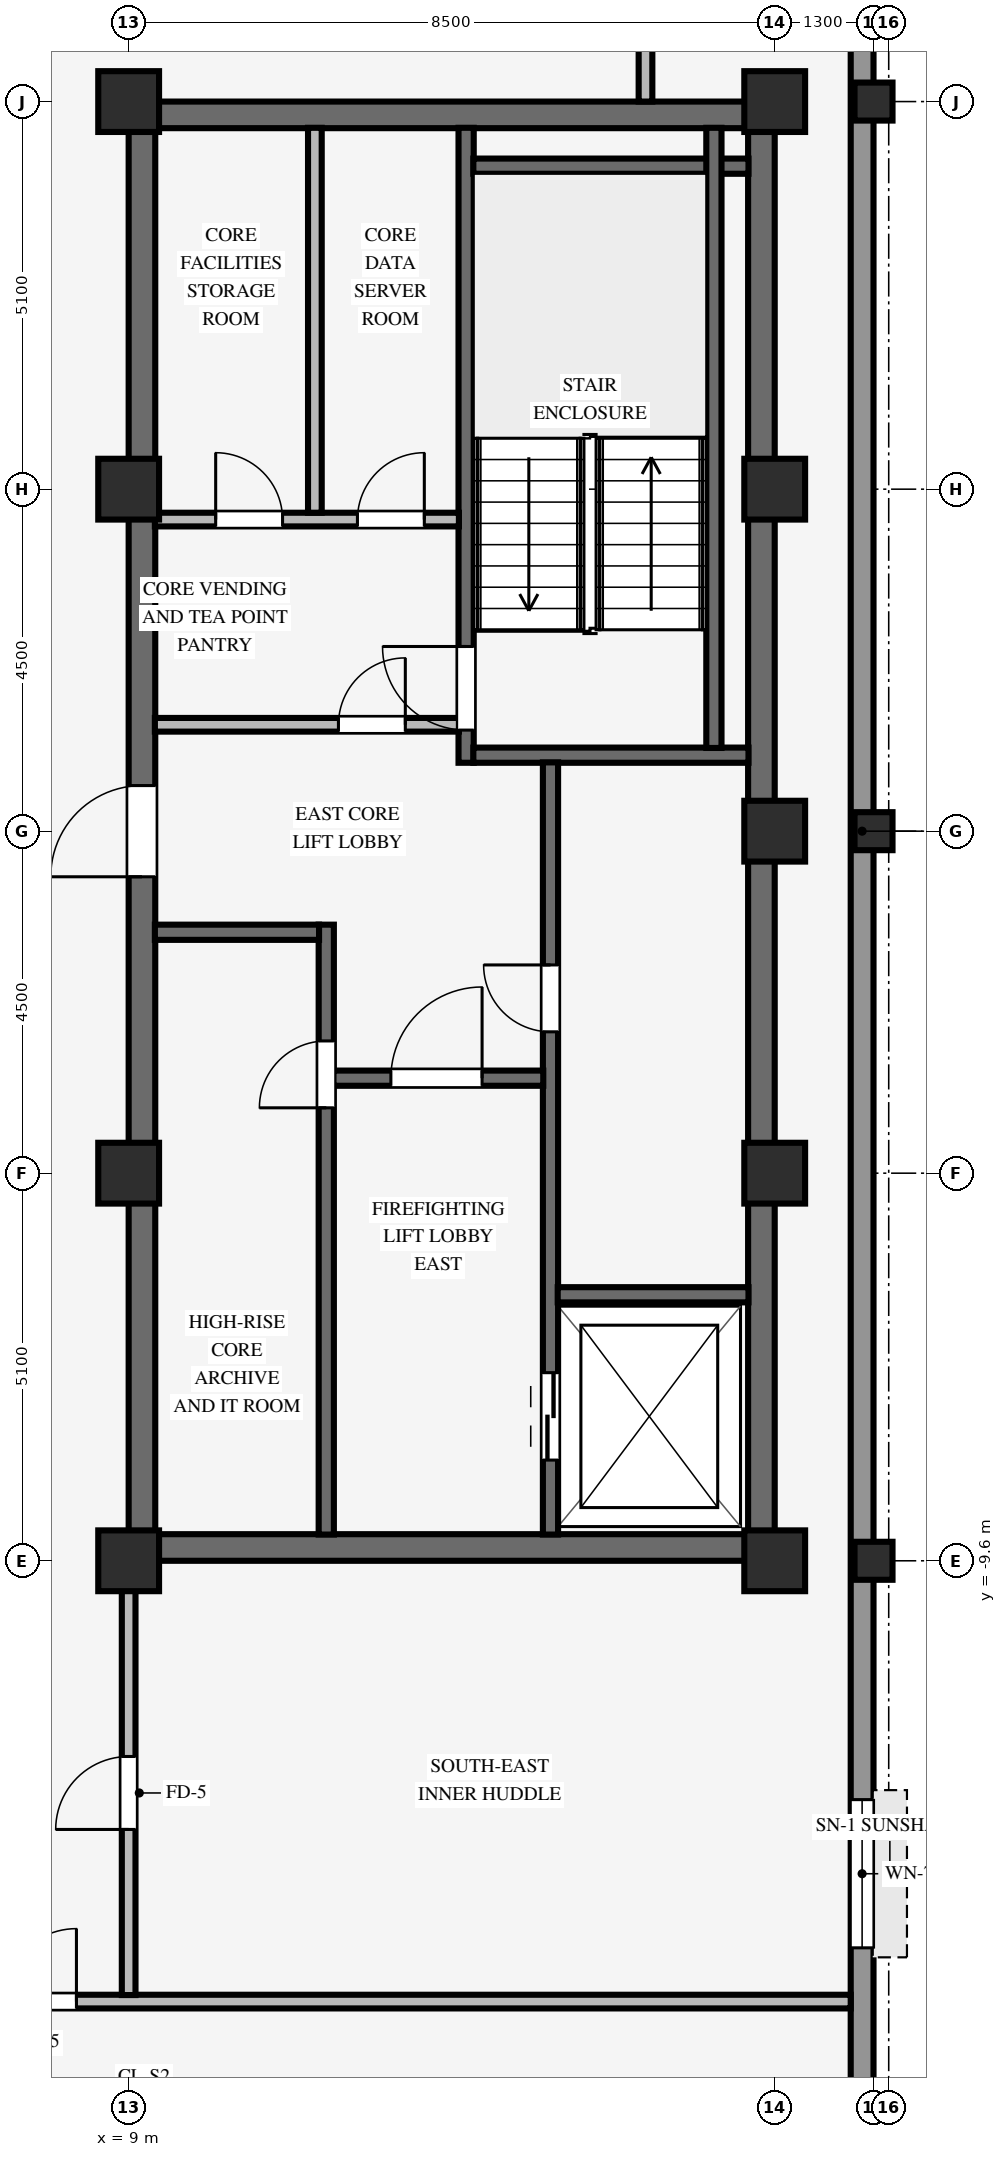
"""IFC4 building model, lengths in metres.
Left out: names, types, materials, properties, quantities, classifications, styles, units other than length and angle.
Written with IfcOpenShell. Run it as: python <this file> out.ifc"""

import sys

from ifc_helpers import new_model, si_unit, direction, frame, frame_2d, origin, origin_2d, place, context, subcontext, project, spatial, rectangle, hollow_rectangle, extrude, source, transform, mapped, element, fill, save


model = new_model("IFC4")
c1 = context("Model", 3, precision=1e-05, world=origin(), true_north=direction((0.0, 1.0)))
c2 = subcontext(c1, "Body", "Model", "MODEL_VIEW")
j1 = project(units=[si_unit("LENGTHUNIT", "METRE"), si_unit("PLANEANGLEUNIT", "RADIAN")], contexts=[c1])
p1 = place(None, origin())
s1 = spatial("IfcSite", under=j1, at=p1, CompositionType="ELEMENT")
p2 = place(p1, origin())
s2 = spatial("IfcBuilding", under=s1, at=p2, CompositionType="ELEMENT")
p3 = place(p2, frame((0.0, 0.0, 242.0)))
s3 = spatial("IfcBuildingStorey", under=s2, at=p3, CompositionType="ELEMENT", Elevation=242.0)
for number, where, z_axis, x_axis in (
    (1, (9.0, -9.425, 0.0), (0.0, 0.0, 1.0), (1.0, 0.0, 0.0)),
    (2, (9.0, 9.425, 0.0), (0.0, 0.0, 1.0), (1.0, 0.0, 0.0)),
):
    element("IfcWall", number, at=place(p3, frame(where, z_axis=z_axis, x_axis=x_axis)), inside=s3, PredefinedType="SHEAR", context=c2, shape_type="SweptSolid", body=[
        extrude(rectangle(XDim=8.5, YDim=0.35, at=frame_2d((4.25, 0.0))), origin(), (0.0, 0.0, 1.0), 3.25),
    ])
p4 = place(p3, frame((9.175, -9.255, 0.0), z_axis=(0.0, 0.0, 1.0), x_axis=(0.0, 1.0, 0.0)))
e3 = element("IfcWall", 3, at=p4, inside=s3, PredefinedType="SHEAR", context=c2, shape_type="SweptSolid", body=[
    extrude(rectangle(XDim=18.51, YDim=0.35, at=frame_2d((9.255, 0.0))), origin(), (0.0, 0.0, 1.0), 3.25),
])
p5 = place(p4, frame((8.655, 0.0, 0.0)))
e4 = element("IfcOpeningElement", 4, at=p5, cuts=e3, PredefinedType="OPENING", context=c2, shape_type="SweptSolid", body=[
    extrude(rectangle(XDim=1.2, YDim=2.15, at=frame_2d((0.6, 1.075))), frame((0.0, 0.185, 0.0), z_axis=(0.0, -1.0, 0.0), x_axis=(1.0, 0.0, 0.0)), (0.0, 0.0, 1.0), 0.37),
])
p6 = place(p3, frame((17.325, -9.255, 0.0), z_axis=(0.0, 0.0, 1.0), x_axis=(0.0, 1.0, 0.0)))
e5 = element("IfcWall", 5, at=p6, inside=s3, PredefinedType="SHEAR", context=c2, shape_type="SweptSolid", body=[
    extrude(rectangle(XDim=18.51, YDim=0.35, at=frame_2d((9.255, 0.0))), origin(), (0.0, 0.0, 1.0), 3.25),
])
for number, where, z_axis, x_axis in (
    (6, (9.0, -9.6, 0.0), (0.0, 0.0, 1.0), (1.0, 0.0, 0.0)),
    (7, (9.0, -4.5, 0.0), (0.0, 0.0, 1.0), (1.0, 0.0, 0.0)),
    (8, (9.0, 4.5, 0.0), (0.0, 0.0, 1.0), (1.0, 0.0, 0.0)),
    (9, (9.0, 9.6, 0.0), (0.0, 0.0, 1.0), (1.0, 0.0, 0.0)),
    (10, (17.5, -9.6, 0.0), (0.0, 0.0, 1.0), (1.0, 0.0, 0.0)),
    (11, (17.5, -4.5, 0.0), (0.0, 0.0, 1.0), (1.0, 0.0, 0.0)),
    (12, (17.5, 4.5, 0.0), (0.0, 0.0, 1.0), (1.0, 0.0, 0.0)),
    (13, (17.5, 9.6, 0.0), (0.0, 0.0, 1.0), (1.0, 0.0, 0.0)),
    (14, (17.5, 0.0, 0.0), (0.0, 0.0, 1.0), (1.0, 0.0, 0.0)),
):
    element("IfcColumn", number, at=place(p3, frame(where, z_axis=z_axis, x_axis=x_axis)), inside=s3, PredefinedType="COLUMN", context=c2, shape_type="SweptSolid", body=[
        extrude(rectangle(XDim=0.8, YDim=0.8, at=origin_2d()), origin(), (0.0, 0.0, 1.0), 3.25),
    ])
for number, where, z_axis, x_axis in (
    (15, (18.8, -9.6, 0.0), (0.0, 0.0, 1.0), (1.0, 0.0, 0.0)),
    (16, (18.8, 0.0, 0.0), (0.0, 0.0, 1.0), (1.0, 0.0, 0.0)),
    (17, (18.8, 9.6, 0.0), (0.0, 0.0, 1.0), (1.0, 0.0, 0.0)),
):
    element("IfcColumn", number, at=place(p3, frame(where, z_axis=z_axis, x_axis=x_axis)), inside=s3, PredefinedType="COLUMN", context=c2, shape_type="SweptSolid", body=[
        extrude(hollow_rectangle(XDim=0.5, YDim=0.5, WallThickness=0.032, InnerFilletRadius=0.032, OuterFilletRadius=0.064, at=origin_2d()), origin(), (0.0, 0.0, 1.0), 3.25),
    ])
p7 = place(p3, frame((18.65, -17.004, 0.0), z_axis=(0.0, 0.0, 1.0), x_axis=(0.0, 1.0, 0.0)))
e18 = element("IfcWall", 18, at=p7, inside=s3, PredefinedType="STANDARD", context=c2, shape_type="SweptSolid", body=[
    extrude(rectangle(XDim=34.008, YDim=0.3, at=frame_2d((17.004, 0.0))), origin(), (0.0, 0.0, 1.0), 2.585),
])
p8 = place(p7, frame((2.311, 0.0, 0.8)))
e19 = element("IfcOpeningElement", 19, at=p8, cuts=e18, PredefinedType="OPENING", context=c2, shape_type="SweptSolid", body=[
    extrude(rectangle(XDim=1.95, YDim=1.48, at=frame_2d((0.975, 0.74))), frame((0.0, 0.16, 0.0), z_axis=(0.0, -1.0, 0.0), x_axis=(1.0, 0.0, 0.0)), (0.0, 0.0, 1.0), 0.32),
])
p9 = place(p7, frame((29.747, 0.0, 0.8)))
e20 = element("IfcOpeningElement", 20, at=p9, cuts=e18, PredefinedType="OPENING", context=c2, shape_type="SweptSolid", body=[
    extrude(rectangle(XDim=1.95, YDim=1.48, at=frame_2d((0.975, 0.74))), frame((0.0, 0.16, 0.0), z_axis=(0.0, -1.0, 0.0), x_axis=(1.0, 0.0, 0.0)), (0.0, 0.0, 1.0), 0.32),
])
p10 = place(p3, frame((13.44, 0.9, 0.0), z_axis=(0.0, 0.0, 1.0), x_axis=(0.0, 1.0, 0.0)))
e21 = element("IfcWall", 21, at=p10, inside=s3, PredefinedType="SHEAR", context=c2, shape_type="SweptSolid", body=[
    extrude(rectangle(XDim=8.355, YDim=0.2, at=frame_2d((4.177, 0.0))), origin(), (0.0, 0.0, 1.0), 3.25),
])
p11 = place(p10, frame((0.43, 0.0, 0.0)))
e22 = element("IfcOpeningElement", 22, at=p11, cuts=e21, PredefinedType="OPENING", context=c2, shape_type="SweptSolid", body=[
    extrude(rectangle(XDim=1.1, YDim=2.15, at=frame_2d((0.55, 1.075))), frame((0.0, 0.11, 0.0), z_axis=(0.0, -1.0, 0.0), x_axis=(1.0, 0.0, 0.0)), (0.0, 0.0, 1.0), 0.22),
])
for number, where, z_axis, x_axis in (
    (23, (13.535, 1.0, 0.0), (0.0, 0.0, 1.0), (1.0, 0.0, 0.0)),
    (24, (13.535, 8.75, 0.0), (0.0, 0.0, 1.0), (1.0, 0.0, 0.0)),
):
    element("IfcWall", number, at=place(p3, frame(where, z_axis=z_axis, x_axis=x_axis)), inside=s3, PredefinedType="SHEAR", context=c2, shape_type="SweptSolid", body=[
        extrude(rectangle(XDim=3.62, YDim=0.2, at=frame_2d((1.81, 0.0))), origin(), (0.0, 0.0, 1.0), 3.25),
    ])
p12 = place(p3, frame((16.7, 1.095, 0.0), z_axis=(0.0, 0.0, 1.0), x_axis=(0.0, 1.0, 0.0)))
e25 = element("IfcWall", 25, at=p12, inside=s3, PredefinedType="SHEAR", context=c2, shape_type="SweptSolid", body=[
    extrude(rectangle(XDim=8.16, YDim=0.2, at=frame_2d((4.08, 0.0))), origin(), (0.0, 0.0, 1.0), 3.25),
])
p13 = place(p3, frame((14.55, -9.255, 0.0), z_axis=(0.0, 0.0, 1.0), x_axis=(0.0, 1.0, 0.0)))
e26 = element("IfcWall", 26, at=p13, inside=s3, PredefinedType="SHEAR", context=c2, shape_type="SweptSolid", body=[
    extrude(rectangle(XDim=10.16, YDim=0.2, at=frame_2d((5.08, 0.0))), origin(), (0.0, 0.0, 1.0), 3.25),
])
p14 = place(p13, frame((6.615, 0.0, 0.0)))
e27 = element("IfcOpeningElement", 27, at=p14, cuts=e26, PredefinedType="OPENING", context=c2, shape_type="SweptSolid", body=[
    extrude(rectangle(XDim=0.88, YDim=2.1, at=frame_2d((0.44, 1.05))), frame((0.0, 0.11, 0.0), z_axis=(0.0, -1.0, 0.0), x_axis=(1.0, 0.0, 0.0)), (0.0, 0.0, 1.0), 0.22),
])
p15 = place(p13, frame((0.98, 0.0, 0.0)))
e28 = element("IfcOpeningElement", 28, at=p15, cuts=e26, PredefinedType="OPENING", context=c2, shape_type="SweptSolid", body=[
    extrude(rectangle(XDim=1.15, YDim=2.15, at=frame_2d((0.575, 1.075))), frame((0.0, 0.11, 0.0), z_axis=(0.0, -1.0, 0.0), x_axis=(1.0, 0.0, 0.0)), (0.0, 0.0, 1.0), 0.22),
])
p16 = place(p3, frame((14.645, -6.1, 0.0), z_axis=(0.0, 0.0, 1.0), x_axis=(1.0, 0.0, 0.0)))
e29 = element("IfcWall", 29, at=p16, inside=s3, PredefinedType="SHEAR", context=c2, shape_type="SweptSolid", body=[
    extrude(rectangle(XDim=2.51, YDim=0.2, at=frame_2d((1.255, 0.0))), origin(), (0.0, 0.0, 1.0), 3.25),
])
p17 = place(p3, frame((11.6, -9.255, 0.0), z_axis=(0.0, 0.0, 1.0), x_axis=(0.0, 1.0, 0.0)))
e30 = element("IfcWall", 30, at=p17, inside=s3, PredefinedType="SHEAR", context=c2, shape_type="SweptSolid", body=[
    extrude(rectangle(XDim=8.025, YDim=0.2, at=frame_2d((4.012, 0.0))), origin(), (0.0, 0.0, 1.0), 3.25),
])
p18 = place(p17, frame((5.615, 0.0, 0.0)))
e31 = element("IfcOpeningElement", 31, at=p18, cuts=e30, PredefinedType="OPENING", context=c2, shape_type="SweptSolid", body=[
    extrude(rectangle(XDim=0.88, YDim=2.1, at=frame_2d((0.44, 1.05))), frame((0.0, 0.11, 0.0), z_axis=(0.0, -1.0, 0.0), x_axis=(1.0, 0.0, 0.0)), (0.0, 0.0, 1.0), 0.22),
])
p19 = place(p3, frame((11.695, -3.25, 0.0), z_axis=(0.0, 0.0, 1.0), x_axis=(1.0, 0.0, 0.0)))
e32 = element("IfcWall", 32, at=p19, inside=s3, PredefinedType="SHEAR", context=c2, shape_type="SweptSolid", body=[
    extrude(rectangle(XDim=2.76, YDim=0.2, at=frame_2d((1.38, 0.0))), origin(), (0.0, 0.0, 1.0), 3.25),
])
p20 = place(p19, frame((0.755, 0.0, 0.0)))
e33 = element("IfcOpeningElement", 33, at=p20, cuts=e32, PredefinedType="OPENING", context=c2, shape_type="SweptSolid", body=[
    extrude(rectangle(XDim=1.2, YDim=2.15, at=frame_2d((0.6, 1.075))), frame((0.0, 0.11, 0.0), z_axis=(0.0, -1.0, 0.0), x_axis=(1.0, 0.0, 0.0)), (0.0, 0.0, 1.0), 0.22),
])
p21 = place(p3, frame((9.345, -1.33, 0.0), z_axis=(0.0, 0.0, 1.0), x_axis=(1.0, 0.0, 0.0)))
e34 = element("IfcWall", 34, at=p21, inside=s3, PredefinedType="SHEAR", context=c2, shape_type="SweptSolid", body=[
    extrude(rectangle(XDim=2.16, YDim=0.2, at=frame_2d((1.08, 0.0))), origin(), (0.0, 0.0, 1.0), 3.25),
])
p22 = place(p3, frame((9.345, 1.4, 0.0), z_axis=(0.0, 0.0, 1.0), x_axis=(1.0, 0.0, 0.0)))
e35 = element("IfcWall", 35, at=p22, inside=s3, PredefinedType="PARTITIONING", context=c2, shape_type="SweptSolid", body=[
    extrude(rectangle(XDim=4.0, YDim=0.18, at=frame_2d((2.0, 0.0))), origin(), (0.0, 0.0, 1.0), 3.24),
])
p23 = place(p22, frame((2.415, 0.0, 0.0)))
e36 = element("IfcOpeningElement", 36, at=p23, cuts=e35, PredefinedType="OPENING", context=c2, shape_type="SweptSolid", body=[
    extrude(rectangle(XDim=0.88, YDim=2.1, at=frame_2d((0.44, 1.05))), frame((0.0, 0.1, 0.0), z_axis=(0.0, -1.0, 0.0), x_axis=(1.0, 0.0, 0.0)), (0.0, 0.0, 1.0), 0.2),
])
p24 = place(p3, frame((9.345, 4.1, 0.0), z_axis=(0.0, 0.0, 1.0), x_axis=(1.0, 0.0, 0.0)))
e37 = element("IfcWall", 37, at=p24, inside=s3, PredefinedType="PARTITIONING", context=c2, shape_type="SweptSolid", body=[
    extrude(rectangle(XDim=4.0, YDim=0.18, at=frame_2d((2.0, 0.0))), origin(), (0.0, 0.0, 1.0), 3.24),
])
p25 = place(p24, frame((0.8, 0.0, 0.0)))
e38 = element("IfcOpeningElement", 38, at=p25, cuts=e37, PredefinedType="OPENING", context=c2, shape_type="SweptSolid", body=[
    extrude(rectangle(XDim=0.88, YDim=2.1, at=frame_2d((0.44, 1.05))), frame((0.0, 0.1, 0.0), z_axis=(0.0, -1.0, 0.0), x_axis=(1.0, 0.0, 0.0)), (0.0, 0.0, 1.0), 0.2),
])
p26 = place(p24, frame((2.665, 0.0, 0.0)))
e39 = element("IfcOpeningElement", 39, at=p26, cuts=e37, PredefinedType="OPENING", context=c2, shape_type="SweptSolid", body=[
    extrude(rectangle(XDim=0.88, YDim=2.1, at=frame_2d((0.44, 1.05))), frame((0.0, 0.1, 0.0), z_axis=(0.0, -1.0, 0.0), x_axis=(1.0, 0.0, 0.0)), (0.0, 0.0, 1.0), 0.2),
])
p27 = place(p3, frame((11.45, 4.19, 0.0), z_axis=(0.0, 0.0, 1.0), x_axis=(0.0, 1.0, 0.0)))
e40 = element("IfcWall", 40, at=p27, inside=s3, PredefinedType="PARTITIONING", context=c2, shape_type="SweptSolid", body=[
    extrude(rectangle(XDim=5.065, YDim=0.18, at=frame_2d((2.532, 0.0))), origin(), (0.0, 0.0, 1.0), 3.24),
])
p28 = place(p3, frame((6.666, -15.4, 0.0), z_axis=(0.0, 0.0, 1.0), x_axis=(1.0, 0.0, 0.0)))
e41 = element("IfcWall", 41, at=p28, inside=s3, PredefinedType="PARTITIONING", context=c2, shape_type="SweptSolid", body=[
    extrude(rectangle(XDim=11.834, YDim=0.18, at=frame_2d((5.917, 0.0))), origin(), (0.0, 0.0, 1.0), 3.24),
])
p29 = place(p28, frame((0.687, 0.0, 0.0)))
e42 = element("IfcOpeningElement", 42, at=p29, cuts=e41, PredefinedType="OPENING", context=c2, shape_type="SweptSolid", body=[
    extrude(rectangle(XDim=0.96, YDim=2.1, at=frame_2d((0.48, 1.05))), frame((0.0, 0.1, 0.0), z_axis=(0.0, -1.0, 0.0), x_axis=(1.0, 0.0, 0.0)), (0.0, 0.0, 1.0), 0.2),
])
p30 = place(p3, frame((9.0, -15.314, 0.0), z_axis=(0.0, 0.0, 1.0), x_axis=(0.0, 1.0, 0.0)))
e43 = element("IfcWall", 43, at=p30, inside=s3, PredefinedType="PARTITIONING", context=c2, shape_type="SweptSolid", body=[
    extrude(rectangle(XDim=5.318, YDim=0.18, at=frame_2d((2.659, 0.0))), origin(), (0.0, 0.0, 1.0), 2.772),
])
p31 = place(p30, frame((2.179, 0.0, 0.0)))
e44 = element("IfcOpeningElement", 44, at=p31, cuts=e43, PredefinedType="OPENING", context=c2, shape_type="SweptSolid", body=[
    extrude(rectangle(XDim=0.96, YDim=2.1, at=frame_2d((0.48, 1.05))), frame((0.0, 0.1, 0.0), z_axis=(0.0, -1.0, 0.0), x_axis=(1.0, 0.0, 0.0)), (0.0, 0.0, 1.0), 0.2),
])
p32 = place(p3, frame((15.8, 9.6, 0.0), z_axis=(0.0, 0.0, 1.0), x_axis=(0.0, 1.0, 0.0)))
e45 = element("IfcWall", 45, at=p32, inside=s3, PredefinedType="PARTITIONING", context=c2, shape_type="SweptSolid", body=[
    extrude(rectangle(XDim=2.514, YDim=0.18, at=frame_2d((1.257, 0.0))), origin(), (0.0, 0.0, 1.0), 3.24),
])
m1 = source(origin(), c2, "Body", "SweptSolid", [
    extrude(rectangle(XDim=1.95, YDim=1.48, at=frame_2d((0.975, 0.74))), frame((0.0, 0.03, 0.0), z_axis=(0.0, -1.0, 0.0), x_axis=(1.0, 0.0, 0.0)), (0.0, 0.0, 1.0), 0.06),
])
p33 = place(p8, origin())
e46 = element("IfcWindow", 46, at=p33, inside=s3, PartitioningType="SINGLE_PANEL", PredefinedType="WINDOW", context=c2, shape_type="MappedRepresentation", body=[
    mapped(m1, transform((0.0, 0.0, 0.0), scale=1.0)),
])
fill(e19, e46)
m2 = source(origin(), c2, "Body", "SweptSolid", [
    extrude(rectangle(XDim=1.1, YDim=2.15, at=frame_2d((0.55, 1.075))), frame((0.0, 0.025, 0.0), z_axis=(0.0, -1.0, 0.0), x_axis=(1.0, 0.0, 0.0)), (0.0, 0.0, 1.0), 0.05),
])
p34 = place(p11, origin())
e47 = element("IfcDoor", 47, at=p34, inside=s3, OperationType="SINGLE_SWING_RIGHT", PredefinedType="DOOR", context=c2, shape_type="MappedRepresentation", body=[
    mapped(m2, transform((0.0, 0.0, 0.0), scale=1.0)),
])
fill(e22, e47)
m3 = source(origin(), c2, "Body", "SweptSolid", [
    extrude(rectangle(XDim=0.88, YDim=2.1, at=frame_2d((0.44, 1.05))), frame((0.0, 0.025, 0.0), z_axis=(0.0, -1.0, 0.0), x_axis=(1.0, 0.0, 0.0)), (0.0, 0.0, 1.0), 0.05),
])
p35 = place(p14, origin())
e48 = element("IfcDoor", 48, at=p35, inside=s3, OperationType="SINGLE_SWING_RIGHT", PredefinedType="DOOR", context=c2, shape_type="MappedRepresentation", body=[
    mapped(m3, transform((0.0, 0.0, 0.0), scale=1.0)),
])
fill(e27, e48)
m4 = source(origin(), c2, "Body", "SweptSolid", [
    extrude(rectangle(XDim=1.2, YDim=2.15, at=frame_2d((0.6, 1.075))), frame((0.0, 0.025, 0.0), z_axis=(0.0, -1.0, 0.0), x_axis=(1.0, 0.0, 0.0)), (0.0, 0.0, 1.0), 0.05),
])
p36 = place(p20, origin())
e49 = element("IfcDoor", 49, at=p36, inside=s3, OperationType="SINGLE_SWING_RIGHT", PredefinedType="DOOR", context=c2, shape_type="MappedRepresentation", body=[
    mapped(m4, transform((0.0, 0.0, 0.0), scale=1.0)),
])
fill(e33, e49)
p37 = place(p18, origin())
e50 = element("IfcDoor", 50, at=p37, inside=s3, OperationType="SINGLE_SWING_LEFT", PredefinedType="DOOR", context=c2, shape_type="MappedRepresentation", body=[
    mapped(m3, transform((0.0, 0.0, 0.0), scale=1.0)),
])
fill(e31, e50)
p38 = place(p5, origin())
e51 = element("IfcDoor", 51, at=p38, inside=s3, OperationType="SINGLE_SWING_LEFT", PredefinedType="DOOR", context=c2, shape_type="MappedRepresentation", body=[
    mapped(m4, transform((0.0, 0.0, 0.0), scale=1.0)),
])
fill(e4, e51)
p39 = place(p23, origin())
e52 = element("IfcDoor", 52, at=p39, inside=s3, OperationType="SINGLE_SWING_RIGHT", PredefinedType="DOOR", context=c2, shape_type="MappedRepresentation", body=[
    mapped(m3, transform((0.0, 0.0, 0.0), scale=1.0)),
])
fill(e36, e52)
p40 = place(p25, origin())
e53 = element("IfcDoor", 53, at=p40, inside=s3, OperationType="SINGLE_SWING_LEFT", PredefinedType="DOOR", context=c2, shape_type="MappedRepresentation", body=[
    mapped(m3, transform((0.0, 0.0, 0.0), scale=1.0)),
])
fill(e38, e53)
p41 = place(p26, origin())
e54 = element("IfcDoor", 54, at=p41, inside=s3, OperationType="SINGLE_SWING_RIGHT", PredefinedType="DOOR", context=c2, shape_type="MappedRepresentation", body=[
    mapped(m3, transform((0.0, 0.0, 0.0), scale=1.0)),
])
fill(e39, e54)
m5 = source(origin(), c2, "Body", "SweptSolid", [
    extrude(rectangle(XDim=1.15, YDim=2.15, at=frame_2d((0.575, 1.075))), frame((0.0, 0.025, 0.0), z_axis=(0.0, -1.0, 0.0), x_axis=(1.0, 0.0, 0.0)), (0.0, 0.0, 1.0), 0.05),
])
p42 = place(p15, origin())
e55 = element("IfcDoor", 55, at=p42, inside=s3, OperationType="DOUBLE_DOOR_SLIDING", PredefinedType="DOOR", context=c2, shape_type="MappedRepresentation", body=[
    mapped(m5, transform((0.0, 0.0, 0.0), scale=1.0)),
])
fill(e28, e55)
m6 = source(origin(), c2, "Body", "SweptSolid", [
    extrude(rectangle(XDim=0.96, YDim=2.1, at=frame_2d((0.48, 1.05))), frame((0.0, 0.025, 0.0), z_axis=(0.0, -1.0, 0.0), x_axis=(1.0, 0.0, 0.0)), (0.0, 0.0, 1.0), 0.05),
])
p43 = place(p31, origin())
e56 = element("IfcDoor", 56, at=p43, inside=s3, OperationType="SINGLE_SWING_LEFT", PredefinedType="DOOR", context=c2, shape_type="MappedRepresentation", body=[
    mapped(m6, transform((0.0, 0.0, 0.0), scale=1.0)),
])
fill(e44, e56)
p44 = place(p29, origin())
e57 = element("IfcDoor", 57, at=p44, inside=s3, OperationType="SINGLE_SWING_RIGHT", PredefinedType="DOOR", context=c2, shape_type="MappedRepresentation", body=[
    mapped(m6, transform((0.0, 0.0, 0.0), scale=1.0)),
])
fill(e42, e57)
save(model, sys.argv[1])
